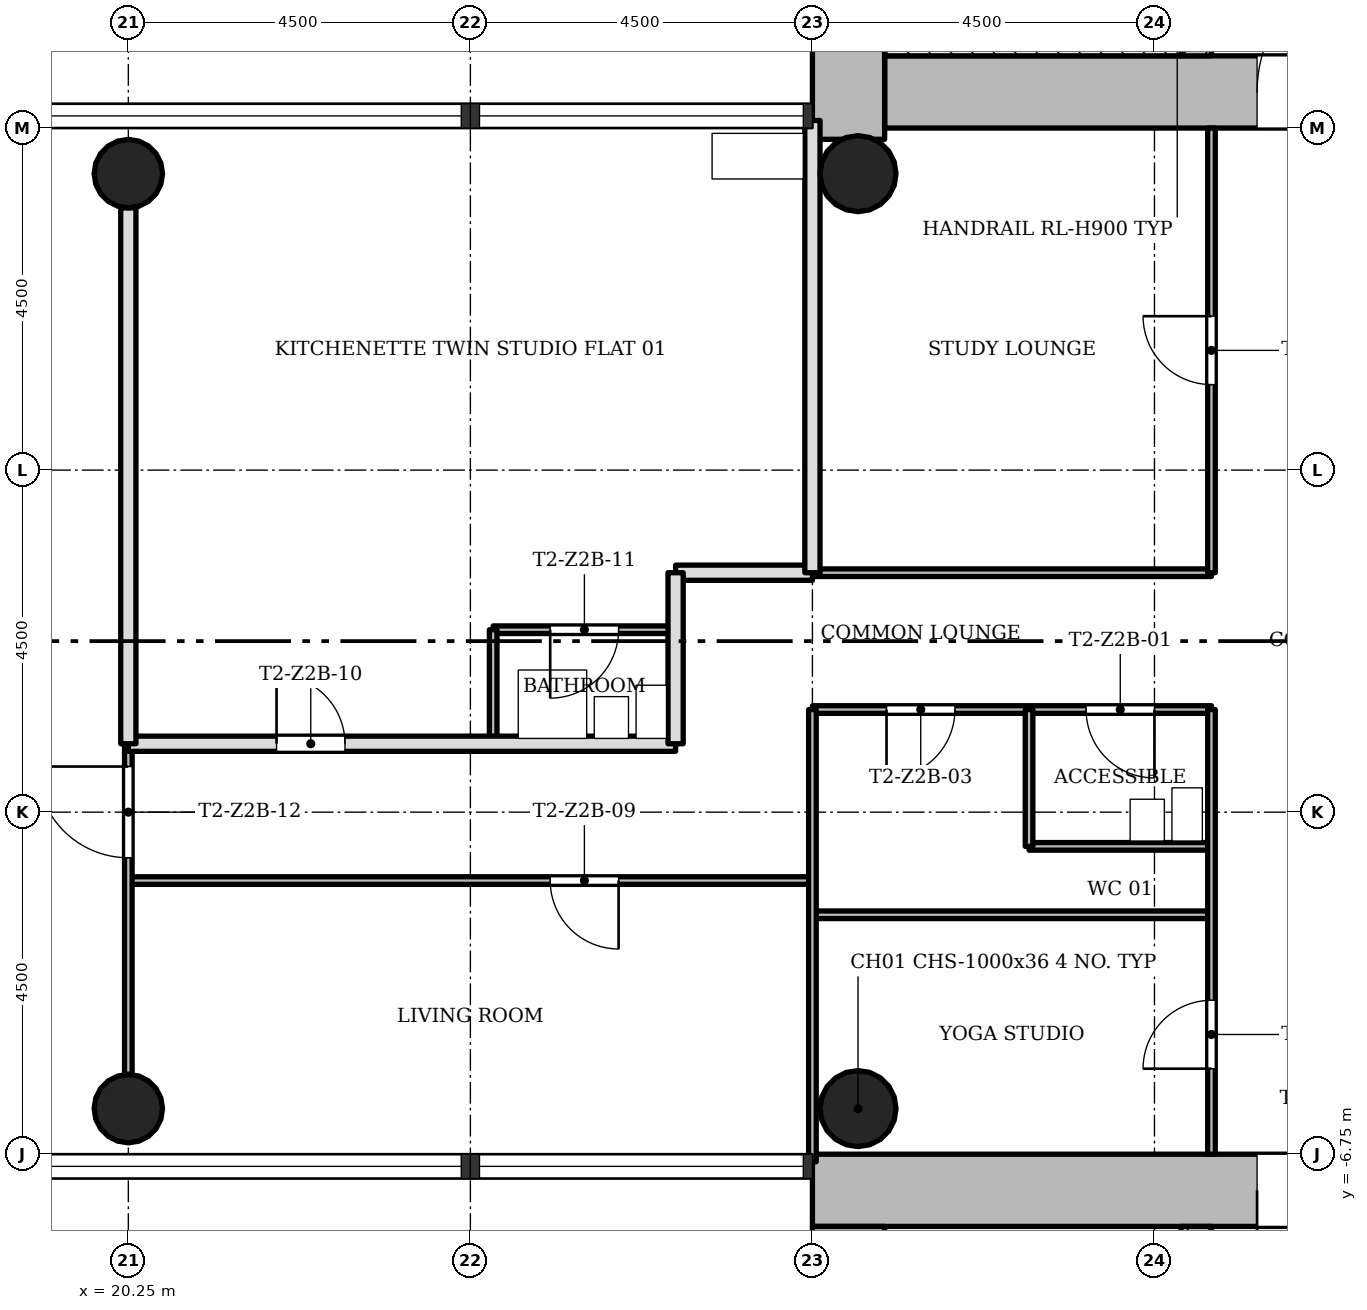
"""IFC4 building model, lengths in metres.
Left out: names, types, materials, properties, quantities, classifications, styles, units other than length and angle.
Written with IfcOpenShell. Run it as: python <this file> out.ifc"""

import sys

from ifc_helpers import new_model, si_unit, direction, frame, frame_2d, origin, origin_2d, place, context, subcontext, project, spatial, rectangle, hollow_circle, extrude, element, fill, save


model = new_model("IFC4")
c1 = context("Model", 3, precision=1e-05, world=origin(), true_north=direction((0.0, 1.0)))
c2 = subcontext(c1, "Body", "Model", "MODEL_VIEW")
j1 = project(units=[si_unit("LENGTHUNIT", "METRE"), si_unit("PLANEANGLEUNIT", "RADIAN")], contexts=[c1])
p1 = place(None, origin())
s1 = spatial("IfcSite", under=j1, at=p1, CompositionType="ELEMENT")
p2 = place(p1, origin())
s2 = spatial("IfcBuilding", under=s1, at=p2, CompositionType="ELEMENT")
p3 = place(p2, frame((0.0, 0.0, 80.0)))
s3 = spatial("IfcBuildingStorey", under=s2, at=p3, CompositionType="ELEMENT", Elevation=80.0)
p4 = place(p3, frame((30.2, 7.225, 0.0), z_axis=(0.0, 0.0, 1.0), x_axis=(1.0, 0.0, 0.0)))
e1 = element("IfcWall", 1, at=p4, inside=s3, PredefinedType="SHEAR", context=c2, shape_type="SweptSolid", body=[
    extrude(rectangle(XDim=12.55, YDim=0.95, at=frame_2d((6.275, 0.0))), origin(), (0.0, 0.0, 1.0), 3.4),
])
p5 = place(p4, frame((4.9, 0.0, 0.0)))
e2 = element("IfcOpeningElement", 2, at=p5, cuts=e1, PredefinedType="OPENING", context=c2, shape_type="SweptSolid", body=[
    extrude(rectangle(XDim=1.8, YDim=2.1, at=frame_2d((0.9, 1.05))), frame((0.0, 0.485, 0.0), z_axis=(0.0, -1.0, 0.0), x_axis=(1.0, 0.0, 0.0)), (0.0, 0.0, 1.0), 0.97),
])
p6 = place(p3, frame((29.725, 15.298, 0.0), z_axis=(0.0, 0.0, 1.0), x_axis=(0.0, -1.0, 0.0)))
e3 = element("IfcWall", 3, at=p6, inside=s3, PredefinedType="SHEAR", context=c2, shape_type="SweptSolid", body=[
    extrude(rectangle(XDim=8.696, YDim=0.95, at=frame_2d((4.348, 0.0))), origin(), (0.0, 0.0, 1.0), 3.4),
])
p7 = place(p3, frame((34.3, 7.7, 0.0), z_axis=(0.0, 0.0, 1.0), x_axis=(0.0, 1.0, 0.0)))
e4 = element("IfcWall", 4, at=p7, inside=s3, PredefinedType="SHEAR", context=c2, shape_type="SweptSolid", body=[
    extrude(rectangle(XDim=7.1, YDim=0.4, at=frame_2d((3.55, 0.0))), origin(), (0.0, 0.0, 1.0), 3.4),
])
p8 = place(p7, frame((0.7, 0.0, 0.0)))
e5 = element("IfcOpeningElement", 5, at=p8, cuts=e4, PredefinedType="OPENING", context=c2, shape_type="SweptSolid", body=[
    extrude(rectangle(XDim=0.9, YDim=2.1, at=frame_2d((0.45, 1.05))), frame((0.0, 0.21, 0.0), z_axis=(0.0, -1.0, 0.0), x_axis=(1.0, 0.0, 0.0)), (0.0, 0.0, 1.0), 0.42),
])
p9 = place(p3, frame((41.8, -7.225, 0.0), z_axis=(0.0, 0.0, 1.0), x_axis=(-1.0, 0.0, 0.0)))
e6 = element("IfcWall", 6, at=p9, inside=s3, PredefinedType="SHEAR", context=c2, shape_type="SweptSolid", body=[
    extrude(rectangle(XDim=12.55, YDim=0.95, at=frame_2d((6.275, 0.0))), origin(), (0.0, 0.0, 1.0), 3.4),
])
p10 = place(p9, frame((4.9, 0.0, 0.0)))
e7 = element("IfcOpeningElement", 7, at=p10, cuts=e6, PredefinedType="OPENING", context=c2, shape_type="SweptSolid", body=[
    extrude(rectangle(XDim=1.8, YDim=2.1, at=frame_2d((0.9, 1.05))), frame((0.0, 0.485, 0.0), z_axis=(0.0, -1.0, 0.0), x_axis=(1.0, 0.0, 0.0)), (0.0, 0.0, 1.0), 0.97),
])
p11 = place(p3, frame((29.725, -7.7, 0.0), z_axis=(0.0, 0.0, 1.0), x_axis=(0.0, -1.0, 0.0)))
e8 = element("IfcWall", 8, at=p11, inside=s3, PredefinedType="SHEAR", context=c2, shape_type="SweptSolid", body=[
    extrude(rectangle(XDim=8.05, YDim=0.95, at=frame_2d((4.025, 0.0))), origin(), (0.0, 0.0, 1.0), 3.4),
])
p12 = place(p3, frame((34.3, -14.8, 0.0), z_axis=(0.0, 0.0, 1.0), x_axis=(0.0, 1.0, 0.0)))
e9 = element("IfcWall", 9, at=p12, inside=s3, PredefinedType="SHEAR", context=c2, shape_type="SweptSolid", body=[
    extrude(rectangle(XDim=7.1, YDim=0.4, at=frame_2d((3.55, 0.0))), origin(), (0.0, 0.0, 1.0), 3.4),
])
p13 = place(p12, frame((5.2, 0.0, 0.0)))
e10 = element("IfcOpeningElement", 10, at=p13, cuts=e9, PredefinedType="OPENING", context=c2, shape_type="SweptSolid", body=[
    extrude(rectangle(XDim=1.1, YDim=2.1, at=frame_2d((0.55, 1.05))), frame((0.0, 0.21, 0.0), z_axis=(0.0, -1.0, 0.0), x_axis=(1.0, 0.0, 0.0)), (0.0, 0.0, 1.0), 0.42),
])
for number, where, z_axis, x_axis in (
    (11, (20.25, 6.15, 0.0), (0.0, 0.0, 1.0), (1.0, 0.0, 0.0)),
    (12, (20.25, -6.15, 0.0), (0.0, 0.0, 1.0), (1.0, 0.0, 0.0)),
):
    element("IfcColumn", number, at=place(p3, frame(where, z_axis=z_axis, x_axis=x_axis)), inside=s3, PredefinedType="COLUMN", context=c2, shape_type="SweptSolid", body=[
        extrude(hollow_circle(Radius=0.45, WallThickness=0.032, at=origin_2d()), origin(), (0.0, 0.0, 1.0), 3.4),
    ])
for number, where, z_axis, x_axis in (
    (13, (29.85, 6.15, 0.0), (0.0, 0.0, 1.0), (1.0, 0.0, 0.0)),
    (14, (29.85, -6.15, 0.0), (0.0, 0.0, 1.0), (1.0, 0.0, 0.0)),
):
    element("IfcColumn", number, at=place(p3, frame(where, z_axis=z_axis, x_axis=x_axis)), inside=s3, PredefinedType="COLUMN", context=c2, shape_type="SweptSolid", body=[
        extrude(hollow_circle(Radius=0.5, WallThickness=0.036, at=origin_2d()), origin(), (0.0, 0.0, 1.0), 3.4),
    ])
p14 = place(p3, frame((34.5, -3.6, 0.0), z_axis=(0.0, 0.0, 1.0), x_axis=(-1.0, 0.0, 0.0)))
e15 = element("IfcWall", 15, at=p14, inside=s3, PredefinedType="PARTITIONING", context=c2, shape_type="SweptSolid", body=[
    extrude(rectangle(XDim=5.25, YDim=0.1, at=frame_2d((2.625, 0.0))), origin(), (0.0, 0.0, 1.0), 3.0),
])
p15 = place(p3, frame((29.25, -3.15, 0.0), z_axis=(0.0, 0.0, 1.0), x_axis=(-1.0, 0.0, 0.0)))
e16 = element("IfcWall", 16, at=p15, inside=s3, PredefinedType="PARTITIONING", context=c2, shape_type="SweptSolid", body=[
    extrude(rectangle(XDim=9.0, YDim=0.1, at=frame_2d((4.5, 0.0))), origin(), (0.0, 0.0, 1.0), 3.0),
])
p16 = place(p15, frame((2.55, 0.0, 0.0)))
e17 = element("IfcOpeningElement", 17, at=p16, cuts=e16, PredefinedType="OPENING", context=c2, shape_type="SweptSolid", body=[
    extrude(rectangle(XDim=0.9, YDim=2.1, at=frame_2d((0.45, 1.05))), frame((0.0, 0.06, 0.0), z_axis=(0.0, -1.0, 0.0), x_axis=(1.0, 0.0, 0.0)), (0.0, 0.0, 1.0), 0.12),
])
p17 = place(p3, frame((34.5, -2.7, 0.0), z_axis=(0.0, 0.0, 1.0), x_axis=(-1.0, 0.0, 0.0)))
e18 = element("IfcWall", 18, at=p17, inside=s3, PredefinedType="PARTITIONING", context=c2, shape_type="SweptSolid", body=[
    extrude(rectangle(XDim=2.4, YDim=0.1, at=frame_2d((1.2, 0.0))), origin(), (0.0, 0.0, 1.0), 3.0),
])
p18 = place(p3, frame((27.45, -1.35, 0.0), z_axis=(0.0, 0.0, 1.0), x_axis=(-1.0, 0.0, 0.0)))
e19 = element("IfcWall", 19, at=p18, inside=s3, PredefinedType="SOLIDWALL", context=c2, shape_type="SweptSolid", body=[
    extrude(rectangle(XDim=7.2, YDim=0.2, at=frame_2d((3.6, 0.0))), origin(), (0.0, 0.0, 1.0), 3.0),
])
p19 = place(p18, frame((4.35, 0.0, 0.0)))
e20 = element("IfcOpeningElement", 20, at=p19, cuts=e19, PredefinedType="OPENING", context=c2, shape_type="SweptSolid", body=[
    extrude(rectangle(XDim=0.9, YDim=2.1, at=frame_2d((0.45, 1.05))), frame((0.0, 0.11, 0.0), z_axis=(0.0, -1.0, 0.0), x_axis=(1.0, 0.0, 0.0)), (0.0, 0.0, 1.0), 0.22),
])
p20 = place(p3, frame((34.5, -0.9, 0.0), z_axis=(0.0, 0.0, 1.0), x_axis=(-1.0, 0.0, 0.0)))
e21 = element("IfcWall", 21, at=p20, inside=s3, PredefinedType="PARTITIONING", context=c2, shape_type="SweptSolid", body=[
    extrude(rectangle(XDim=5.25, YDim=0.1, at=frame_2d((2.625, 0.0))), origin(), (0.0, 0.0, 1.0), 3.0),
])
p21 = place(p20, frame((0.75, 0.0, 0.0)))
e22 = element("IfcOpeningElement", 22, at=p21, cuts=e21, PredefinedType="OPENING", context=c2, shape_type="SweptSolid", body=[
    extrude(rectangle(XDim=0.9, YDim=2.1, at=frame_2d((0.45, 1.05))), frame((0.0, 0.06, 0.0), z_axis=(0.0, -1.0, 0.0), x_axis=(1.0, 0.0, 0.0)), (0.0, 0.0, 1.0), 0.12),
])
p22 = place(p20, frame((3.375, 0.0, 0.0)))
e23 = element("IfcOpeningElement", 23, at=p22, cuts=e21, PredefinedType="OPENING", context=c2, shape_type="SweptSolid", body=[
    extrude(rectangle(XDim=0.9, YDim=2.1, at=frame_2d((0.45, 1.05))), frame((0.0, 0.06, 0.0), z_axis=(0.0, -1.0, 0.0), x_axis=(1.0, 0.0, 0.0)), (0.0, 0.0, 1.0), 0.12),
])
p23 = place(p3, frame((27.45, 0.15, 0.0), z_axis=(0.0, 0.0, 1.0), x_axis=(-1.0, 0.0, 0.0)))
e24 = element("IfcWall", 24, at=p23, inside=s3, PredefinedType="PARTITIONING", context=c2, shape_type="SweptSolid", body=[
    extrude(rectangle(XDim=2.4, YDim=0.1, at=frame_2d((1.2, 0.0))), origin(), (0.0, 0.0, 1.0), 3.0),
])
p24 = place(p23, frame((0.75, 0.0, 0.0)))
e25 = element("IfcOpeningElement", 25, at=p24, cuts=e24, PredefinedType="OPENING", context=c2, shape_type="SweptSolid", body=[
    extrude(rectangle(XDim=0.9, YDim=2.1, at=frame_2d((0.45, 1.05))), frame((0.0, 0.06, 0.0), z_axis=(0.0, -1.0, 0.0), x_axis=(1.0, 0.0, 0.0)), (0.0, 0.0, 1.0), 0.12),
])
p25 = place(p3, frame((34.5, 0.9, 0.0), z_axis=(0.0, 0.0, 1.0), x_axis=(-1.0, 0.0, 0.0)))
e26 = element("IfcWall", 26, at=p25, inside=s3, PredefinedType="PARTITIONING", context=c2, shape_type="SweptSolid", body=[
    extrude(rectangle(XDim=5.25, YDim=0.1, at=frame_2d((2.625, 0.0))), origin(), (0.0, 0.0, 1.0), 3.0),
])
p26 = place(p3, frame((29.25, 0.9, 0.0), z_axis=(0.0, 0.0, 1.0), x_axis=(-1.0, 0.0, 0.0)))
e27 = element("IfcWall", 27, at=p26, inside=s3, PredefinedType="SOLIDWALL", context=c2, shape_type="SweptSolid", body=[
    extrude(rectangle(XDim=1.8, YDim=0.2, at=frame_2d((0.9, 0.0))), origin(), (0.0, 0.0, 1.0), 3.0),
])
p27 = place(p3, frame((34.5, -6.75, 0.0), z_axis=(0.0, 0.0, 1.0), x_axis=(0.0, 1.0, 0.0)))
e28 = element("IfcWall", 28, at=p27, inside=s3, PredefinedType="PARTITIONING", context=c2, shape_type="SweptSolid", body=[
    extrude(rectangle(XDim=5.85, YDim=0.1, at=frame_2d((2.925, 0.0))), origin(), (0.0, 0.0, 1.0), 3.0),
])
p28 = place(p27, frame((1.125, 0.0, 0.0)))
e29 = element("IfcOpeningElement", 29, at=p28, cuts=e28, PredefinedType="OPENING", context=c2, shape_type="SweptSolid", body=[
    extrude(rectangle(XDim=0.9, YDim=2.1, at=frame_2d((0.45, 1.05))), frame((0.0, 0.06, 0.0), z_axis=(0.0, -1.0, 0.0), x_axis=(1.0, 0.0, 0.0)), (0.0, 0.0, 1.0), 0.12),
])
p29 = place(p3, frame((34.5, 0.9, 0.0), z_axis=(0.0, 0.0, 1.0), x_axis=(0.0, 1.0, 0.0)))
e30 = element("IfcWall", 30, at=p29, inside=s3, PredefinedType="PARTITIONING", context=c2, shape_type="SweptSolid", body=[
    extrude(rectangle(XDim=5.85, YDim=0.1, at=frame_2d((2.925, 0.0))), origin(), (0.0, 0.0, 1.0), 3.0),
])
p30 = place(p29, frame((2.475, 0.0, 0.0)))
e31 = element("IfcOpeningElement", 31, at=p30, cuts=e30, PredefinedType="OPENING", context=c2, shape_type="SweptSolid", body=[
    extrude(rectangle(XDim=0.9, YDim=2.1, at=frame_2d((0.45, 1.05))), frame((0.0, 0.06, 0.0), z_axis=(0.0, -1.0, 0.0), x_axis=(1.0, 0.0, 0.0)), (0.0, 0.0, 1.0), 0.12),
])
p31 = place(p3, frame((32.1, -2.7, 0.0), z_axis=(0.0, 0.0, 1.0), x_axis=(0.0, 1.0, 0.0)))
e32 = element("IfcWall", 32, at=p31, inside=s3, PredefinedType="PARTITIONING", context=c2, shape_type="SweptSolid", body=[
    extrude(rectangle(XDim=1.8, YDim=0.1, at=frame_2d((0.9, 0.0))), origin(), (0.0, 0.0, 1.0), 3.0),
])
p32 = place(p3, frame((29.25, -6.85, 0.0), z_axis=(0.0, 0.0, 1.0), x_axis=(0.0, 1.0, 0.0)))
e33 = element("IfcWall", 33, at=p32, inside=s3, PredefinedType="PARTITIONING", context=c2, shape_type="SweptSolid", body=[
    extrude(rectangle(XDim=5.95, YDim=0.1, at=frame_2d((2.975, 0.0))), origin(), (0.0, 0.0, 1.0), 3.0),
])
p33 = place(p3, frame((29.25, 0.9, 0.0), z_axis=(0.0, 0.0, 1.0), x_axis=(0.0, 1.0, 0.0)))
e34 = element("IfcWall", 34, at=p33, inside=s3, PredefinedType="SOLIDWALL", context=c2, shape_type="SweptSolid", body=[
    extrude(rectangle(XDim=5.95, YDim=0.2, at=frame_2d((2.975, 0.0))), origin(), (0.0, 0.0, 1.0), 3.0),
])
p34 = place(p3, frame((27.45, -1.35, 0.0), z_axis=(0.0, 0.0, 1.0), x_axis=(0.0, 1.0, 0.0)))
e35 = element("IfcWall", 35, at=p34, inside=s3, PredefinedType="SOLIDWALL", context=c2, shape_type="SweptSolid", body=[
    extrude(rectangle(XDim=2.25, YDim=0.2, at=frame_2d((1.125, 0.0))), origin(), (0.0, 0.0, 1.0), 3.0),
])
p35 = place(p3, frame((25.05, -1.35, 0.0), z_axis=(0.0, 0.0, 1.0), x_axis=(0.0, 1.0, 0.0)))
e36 = element("IfcWall", 36, at=p35, inside=s3, PredefinedType="PARTITIONING", context=c2, shape_type="SweptSolid", body=[
    extrude(rectangle(XDim=1.5, YDim=0.1, at=frame_2d((0.75, 0.0))), origin(), (0.0, 0.0, 1.0), 3.0),
])
p36 = place(p3, frame((20.25, -5.7, 0.0), z_axis=(0.0, 0.0, 1.0), x_axis=(0.0, 1.0, 0.0)))
e37 = element("IfcWall", 37, at=p36, inside=s3, PredefinedType="PARTITIONING", context=c2, shape_type="SweptSolid", body=[
    extrude(rectangle(XDim=4.35, YDim=0.1, at=frame_2d((2.175, 0.0))), origin(), (0.0, 0.0, 1.0), 3.0),
])
p37 = place(p36, frame((2.85, 0.0, 0.0)))
e38 = element("IfcOpeningElement", 38, at=p37, cuts=e37, PredefinedType="OPENING", context=c2, shape_type="SweptSolid", body=[
    extrude(rectangle(XDim=1.2, YDim=2.1, at=frame_2d((0.6, 1.05))), frame((0.0, 0.06, 0.0), z_axis=(0.0, -1.0, 0.0), x_axis=(1.0, 0.0, 0.0)), (0.0, 0.0, 1.0), 0.12),
])
p38 = place(p3, frame((20.25, -1.35, 0.0), z_axis=(0.0, 0.0, 1.0), x_axis=(0.0, 1.0, 0.0)))
e39 = element("IfcWall", 39, at=p38, inside=s3, PredefinedType="SOLIDWALL", context=c2, shape_type="SweptSolid", body=[
    extrude(rectangle(XDim=7.05, YDim=0.2, at=frame_2d((3.525, 0.0))), origin(), (0.0, 0.0, 1.0), 3.0),
])
p39 = place(p3, frame((34.1, 7.825, 0.0), z_axis=(0.0, 0.0, 1.0), x_axis=(-1.0, 0.0, 0.0)))
e40 = element("IfcWall", 40, at=p39, inside=s3, PredefinedType="SHEAR", context=c2, shape_type="SweptSolid", body=[
    extrude(rectangle(XDim=3.9, YDim=0.25, at=frame_2d((1.95, 0.0))), origin(), (0.0, 0.0, 1.0), 3.4),
])
p40 = place(p21, origin())
e41 = element("IfcDoor", 41, at=p40, inside=s3, OperationType="SINGLE_SWING_RIGHT", PredefinedType="DOOR", context=c2, shape_type="SweptSolid", body=[
    extrude(rectangle(XDim=0.9, YDim=2.1, at=frame_2d((0.45, 1.05))), frame((0.0, 0.025, 0.0), z_axis=(0.0, -1.0, 0.0), x_axis=(1.0, 0.0, 0.0)), (0.0, 0.0, 1.0), 0.05),
])
fill(e22, e41)
p41 = place(p30, origin())
e42 = element("IfcDoor", 42, at=p41, inside=s3, OperationType="SINGLE_SWING_LEFT", PredefinedType="DOOR", context=c2, shape_type="SweptSolid", body=[
    extrude(rectangle(XDim=0.9, YDim=2.1, at=frame_2d((0.45, 1.05))), frame((0.0, 0.025, 0.0), z_axis=(0.0, -1.0, 0.0), x_axis=(1.0, 0.0, 0.0)), (0.0, 0.0, 1.0), 0.05),
])
fill(e31, e42)
p42 = place(p22, origin())
e43 = element("IfcDoor", 43, at=p42, inside=s3, OperationType="SINGLE_SWING_LEFT", PredefinedType="DOOR", context=c2, shape_type="SweptSolid", body=[
    extrude(rectangle(XDim=0.9, YDim=2.1, at=frame_2d((0.45, 1.05))), frame((0.0, 0.025, 0.0), z_axis=(0.0, -1.0, 0.0), x_axis=(1.0, 0.0, 0.0)), (0.0, 0.0, 1.0), 0.05),
])
fill(e23, e43)
p43 = place(p28, origin())
e44 = element("IfcDoor", 44, at=p43, inside=s3, OperationType="SINGLE_SWING_RIGHT", PredefinedType="DOOR", context=c2, shape_type="SweptSolid", body=[
    extrude(rectangle(XDim=0.9, YDim=2.1, at=frame_2d((0.45, 1.05))), frame((0.0, 0.025, 0.0), z_axis=(0.0, -1.0, 0.0), x_axis=(1.0, 0.0, 0.0)), (0.0, 0.0, 1.0), 0.05),
])
fill(e29, e44)
p44 = place(p16, origin())
e45 = element("IfcDoor", 45, at=p44, inside=s3, OperationType="SINGLE_SWING_RIGHT", PredefinedType="DOOR", context=c2, shape_type="SweptSolid", body=[
    extrude(rectangle(XDim=0.9, YDim=2.1, at=frame_2d((0.45, 1.05))), frame((0.0, 0.025, 0.0), z_axis=(0.0, -1.0, 0.0), x_axis=(1.0, 0.0, 0.0)), (0.0, 0.0, 1.0), 0.05),
])
fill(e17, e45)
p45 = place(p19, origin())
e46 = element("IfcDoor", 46, at=p45, inside=s3, OperationType="SINGLE_SWING_RIGHT", PredefinedType="DOOR", context=c2, shape_type="SweptSolid", body=[
    extrude(rectangle(XDim=0.9, YDim=2.1, at=frame_2d((0.45, 1.05))), frame((0.0, 0.025, 0.0), z_axis=(0.0, -1.0, 0.0), x_axis=(1.0, 0.0, 0.0)), (0.0, 0.0, 1.0), 0.05),
])
fill(e20, e46)
p46 = place(p24, origin())
e47 = element("IfcDoor", 47, at=p46, inside=s3, OperationType="SINGLE_SWING_LEFT", PredefinedType="DOOR", context=c2, shape_type="SweptSolid", body=[
    extrude(rectangle(XDim=0.9, YDim=2.1, at=frame_2d((0.45, 1.05))), frame((0.0, 0.025, 0.0), z_axis=(0.0, -1.0, 0.0), x_axis=(1.0, 0.0, 0.0)), (0.0, 0.0, 1.0), 0.05),
])
fill(e25, e47)
p47 = place(p37, origin())
e48 = element("IfcDoor", 48, at=p47, inside=s3, OperationType="SINGLE_SWING_LEFT", PredefinedType="DOOR", context=c2, shape_type="SweptSolid", body=[
    extrude(rectangle(XDim=1.2, YDim=2.1, at=frame_2d((0.6, 1.05))), frame((0.0, 0.025, 0.0), z_axis=(0.0, -1.0, 0.0), x_axis=(1.0, 0.0, 0.0)), (0.0, 0.0, 1.0), 0.05),
])
fill(e38, e48)
p48 = place(p5, origin())
e49 = element("IfcDoor", 49, at=p48, inside=s3, OperationType="SINGLE_SWING_LEFT", PredefinedType="DOOR", context=c2, shape_type="SweptSolid", body=[
    extrude(rectangle(XDim=1.8, YDim=2.1, at=frame_2d((0.9, 1.05))), frame((0.0, 0.025, 0.0), z_axis=(0.0, -1.0, 0.0), x_axis=(1.0, 0.0, 0.0)), (0.0, 0.0, 1.0), 0.05),
])
fill(e2, e49)
p49 = place(p10, origin())
e50 = element("IfcDoor", 50, at=p49, inside=s3, OperationType="SINGLE_SWING_LEFT", PredefinedType="DOOR", context=c2, shape_type="SweptSolid", body=[
    extrude(rectangle(XDim=1.8, YDim=2.1, at=frame_2d((0.9, 1.05))), frame((0.0, 0.025, 0.0), z_axis=(0.0, -1.0, 0.0), x_axis=(1.0, 0.0, 0.0)), (0.0, 0.0, 1.0), 0.05),
])
fill(e7, e50)
save(model, sys.argv[1])
